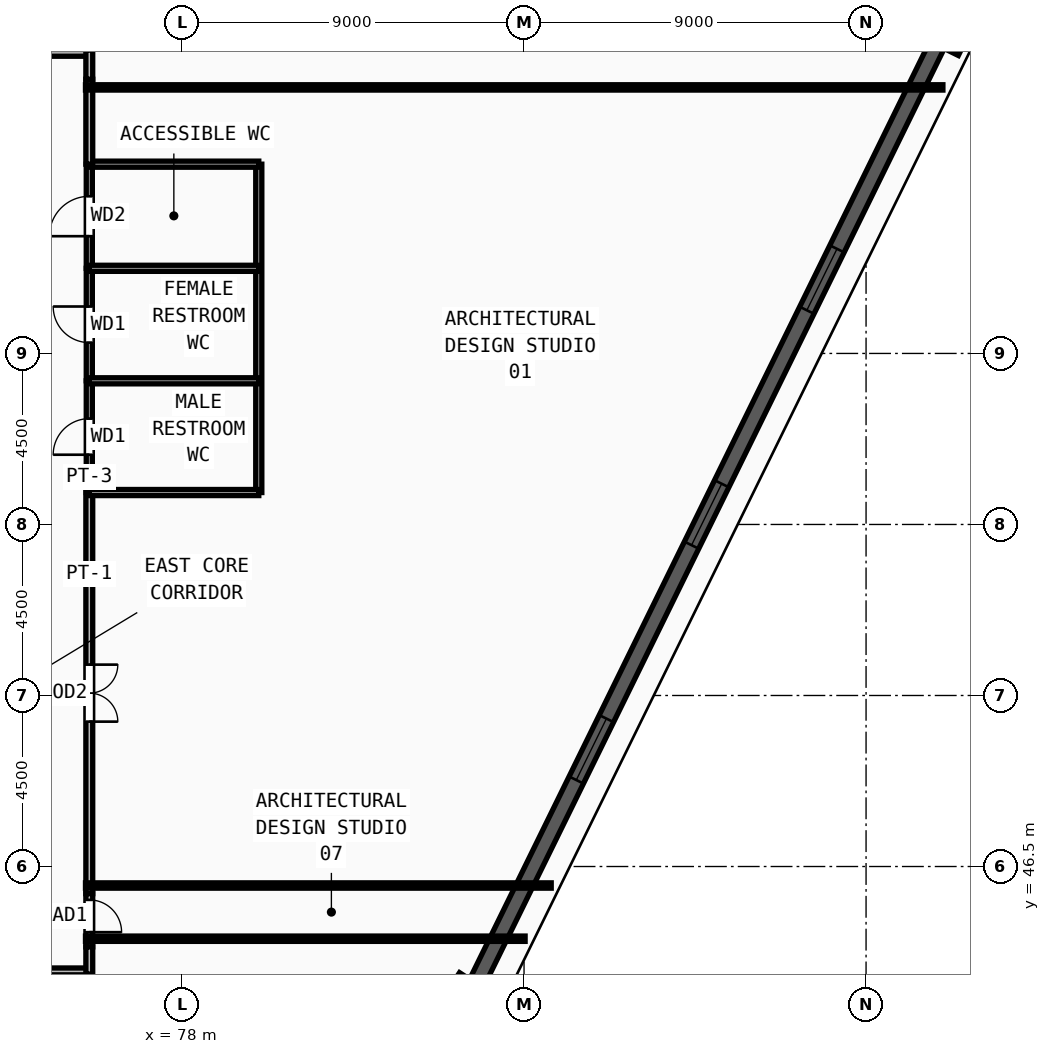
"""IFC4 building model, lengths in metres.
Left out: names, types, materials, properties, quantities, classifications, styles, units other than length and angle.
Written with IfcOpenShell. Run it as: python <this file> out.ifc"""

import sys

from ifc_helpers import new_model, si_unit, direction, frame, frame_2d, origin, origin_2d, place, context, subcontext, project, spatial, rectangle, extrude, source, transform, mapped, element, fill, save


model = new_model("IFC4")
c1 = context("Model", 3, precision=1e-05, world=origin(), true_north=direction((0.0, 1.0)))
c2 = subcontext(c1, "Body", "Model", "MODEL_VIEW")
j1 = project(units=[si_unit("LENGTHUNIT", "METRE"), si_unit("PLANEANGLEUNIT", "RADIAN")], contexts=[c1])
p1 = place(None, origin())
s1 = spatial("IfcSite", under=j1, at=p1, CompositionType="ELEMENT")
p2 = place(p1, origin())
s2 = spatial("IfcBuilding", under=s1, at=p2, CompositionType="ELEMENT")
p3 = place(p2, frame((0.0, 0.0, 63.0)))
s3 = spatial("IfcBuildingStorey", under=s2, at=p3, CompositionType="ELEMENT", Elevation=63.0)
m1 = source(origin(), c2, "Body", "SweptSolid", [
    extrude(rectangle(XDim=1.55, YDim=1.25, at=origin_2d()), origin(), (0.0, 0.0, 1.0), 3.75),
])
for number, where, z_axis, x_axis in (
    (1, (98.209, 68.811, 0.0), (0.0, 0.0, 1.0), (0.441, 0.898, 0.0)),
    (2, (85.401, 42.716, 0.0), (0.0, 0.0, 1.0), (0.548, 0.837, 0.0)),
):
    element("IfcColumn", number, at=place(p3, frame(where, z_axis=z_axis, x_axis=x_axis)), inside=s3, PredefinedType="COLUMN", context=c2, shape_type="MappedRepresentation", body=[
        mapped(m1, transform((0.0, 0.0, 0.0), x_axis=(1.0, 0.0, 0.0), y_axis=(0.0, 1.0, 0.0), z_axis=(0.0, 0.0, 1.0), scale=1.0)),
    ])
p4 = place(p3, frame((85.738, 43.403, 0.0), z_axis=(0.0, 0.0, 1.0), x_axis=(0.440623312768, 0.897692094343, 0.0)))
e3 = element("IfcWall", 3, at=p4, inside=s3, PredefinedType="SOLIDWALL", context=c2, shape_type="SweptSolid", body=[
    extrude(rectangle(XDim=27.538, YDim=0.42, at=frame_2d((13.769, 0.0))), origin(), (0.0, 0.0, 1.0), 3.57),
])
m2 = source(origin(), c2, "Body", "SweptSolid", [
    extrude(rectangle(XDim=1.8, YDim=1.95, at=frame_2d((0.9, 0.975))), frame((0.0, 0.22, 0.0), z_axis=(0.0, -1.0, 0.0), x_axis=(1.0, 0.0, 0.0)), (0.0, 0.0, 1.0), 0.44),
])
p5 = place(p4, frame((5.985, 0.0, 0.55)))
e4 = element("IfcOpeningElement", 4, at=p5, cuts=e3, PredefinedType="OPENING", context=c2, shape_type="MappedRepresentation", body=[
    mapped(m2, transform((0.0, 0.0, 0.0), x_axis=(1.0, 0.0, 0.0), y_axis=(0.0, 1.0, 0.0), z_axis=(0.0, 0.0, 1.0), scale=1.0)),
])
p6 = place(p4, frame((12.869, 0.0, 0.55)))
e5 = element("IfcOpeningElement", 5, at=p6, cuts=e3, PredefinedType="OPENING", context=c2, shape_type="MappedRepresentation", body=[
    mapped(m2, transform((0.0, 0.0, 0.0), x_axis=(1.0, 0.0, 0.0), y_axis=(0.0, 1.0, 0.0), z_axis=(0.0, 0.0, 1.0), scale=1.0)),
])
p7 = place(p4, frame((19.754, 0.0, 0.55)))
e6 = element("IfcOpeningElement", 6, at=p7, cuts=e3, PredefinedType="OPENING", context=c2, shape_type="MappedRepresentation", body=[
    mapped(m2, transform((0.0, 0.0, 0.0), x_axis=(1.0, 0.0, 0.0), y_axis=(0.0, 1.0, 0.0), z_axis=(0.0, 0.0, 1.0), scale=1.0)),
])
p8 = place(p3, frame((75.56, 56.34, 0.0), z_axis=(0.0, 0.0, 1.0), x_axis=(0.0, 1.0, 0.0)))
e7 = element("IfcWall", 7, at=p8, inside=s3, PredefinedType="PARTITIONING", context=c2, shape_type="SweptSolid", body=[
    extrude(rectangle(XDim=2.94, YDim=0.16, at=frame_2d((1.47, 0.0))), origin(), (0.0, 0.0, 1.0), 3.57),
])
m3 = source(origin(), c2, "Body", "SweptSolid", [
    extrude(rectangle(XDim=0.95, YDim=2.15, at=frame_2d((0.475, 1.075))), frame((0.0, 0.09, 0.0), z_axis=(0.0, -1.0, 0.0), x_axis=(1.0, 0.0, 0.0)), (0.0, 0.0, 1.0), 0.18),
])
p9 = place(p8, frame((0.995, 0.0, 0.0)))
e8 = element("IfcOpeningElement", 8, at=p9, cuts=e7, PredefinedType="OPENING", context=c2, shape_type="MappedRepresentation", body=[
    mapped(m3, transform((0.0, 0.0, 0.0), x_axis=(1.0, 0.0, 0.0), y_axis=(0.0, 1.0, 0.0), z_axis=(0.0, 0.0, 1.0), scale=1.0)),
])
p10 = place(p3, frame((75.56, 59.28, 0.0), z_axis=(0.0, 0.0, 1.0), x_axis=(0.0, 1.0, 0.0)))
e9 = element("IfcWall", 9, at=p10, inside=s3, PredefinedType="PARTITIONING", context=c2, shape_type="SweptSolid", body=[
    extrude(rectangle(XDim=2.96, YDim=0.16, at=frame_2d((1.48, 0.0))), origin(), (0.0, 0.0, 1.0), 3.57),
])
p11 = place(p10, frame((1.005, 0.0, 0.0)))
e10 = element("IfcOpeningElement", 10, at=p11, cuts=e9, PredefinedType="OPENING", context=c2, shape_type="MappedRepresentation", body=[
    mapped(m3, transform((0.0, 0.0, 0.0), x_axis=(1.0, 0.0, 0.0), y_axis=(0.0, 1.0, 0.0), z_axis=(0.0, 0.0, 1.0), scale=1.0)),
])
p12 = place(p3, frame((75.56, 62.24, 0.0), z_axis=(0.0, 0.0, 1.0), x_axis=(0.0, 1.0, 0.0)))
e11 = element("IfcWall", 11, at=p12, inside=s3, PredefinedType="PARTITIONING", context=c2, shape_type="SweptSolid", body=[
    extrude(rectangle(XDim=2.74, YDim=0.16, at=frame_2d((1.37, 0.0))), origin(), (0.0, 0.0, 1.0), 3.57),
])
m4 = source(origin(), c2, "Body", "SweptSolid", [
    extrude(rectangle(XDim=1.05, YDim=2.15, at=frame_2d((0.525, 1.075))), frame((0.0, 0.09, 0.0), z_axis=(0.0, -1.0, 0.0), x_axis=(1.0, 0.0, 0.0)), (0.0, 0.0, 1.0), 0.18),
])
p13 = place(p12, frame((0.845, 0.0, 0.0)))
e12 = element("IfcOpeningElement", 12, at=p13, cuts=e11, PredefinedType="OPENING", context=c2, shape_type="MappedRepresentation", body=[
    mapped(m4, transform((0.0, 0.0, 0.0), x_axis=(1.0, 0.0, 0.0), y_axis=(0.0, 1.0, 0.0), z_axis=(0.0, 0.0, 1.0), scale=1.0)),
])
p14 = place(p3, frame((75.56, 56.34, 0.0), z_axis=(0.0, 0.0, 1.0), x_axis=(0.0, -1.0, 0.0)))
e13 = element("IfcWall", 13, at=p14, inside=s3, PredefinedType="PARTITIONING", context=c2, shape_type="SweptSolid", body=[
    extrude(rectangle(XDim=10.555, YDim=0.18, at=frame_2d((5.278, 0.0))), origin(), (0.0, 0.0, 1.0), 3.57),
])
m5 = source(origin(), c2, "Body", "SweptSolid", [
    extrude(rectangle(XDim=1.5, YDim=2.2, at=frame_2d((0.75, 1.1))), frame((0.0, 0.1, 0.0), z_axis=(0.0, -1.0, 0.0), x_axis=(1.0, 0.0, 0.0)), (0.0, 0.0, 1.0), 0.2),
])
p15 = place(p14, frame((4.528, 0.0, 0.0)))
e14 = element("IfcOpeningElement", 14, at=p15, cuts=e13, PredefinedType="OPENING", context=c2, shape_type="MappedRepresentation", body=[
    mapped(m5, transform((0.0, 0.0, 0.0), x_axis=(1.0, 0.0, 0.0), y_axis=(0.0, 1.0, 0.0), z_axis=(0.0, 0.0, 1.0), scale=1.0)),
])
p16 = place(p3, frame((63.785, 67.91, 0.0), z_axis=(0.0, 0.0, 1.0), x_axis=(1.0, 0.0, 0.0)))
e15 = element("IfcWall", 15, at=p16, inside=s3, PredefinedType="PARTITIONING", context=c2, shape_type="SweptSolid", body=[
    extrude(rectangle(XDim=11.845, YDim=0.18, at=frame_2d((5.922, 0.0))), origin(), (0.0, 0.0, 1.0), 3.57),
])
p17 = place(p16, frame((5.172, 0.0, 0.0)))
e16 = element("IfcOpeningElement", 16, at=p17, cuts=e15, PredefinedType="OPENING", context=c2, shape_type="MappedRepresentation", body=[
    mapped(m5, transform((0.0, 0.0, 0.0), x_axis=(1.0, 0.0, 0.0), y_axis=(0.0, 1.0, 0.0), z_axis=(0.0, 0.0, 1.0), scale=1.0)),
])
p18 = place(p3, frame((75.63, 43.74, 0.0), z_axis=(0.0, 0.0, 1.0), x_axis=(-1.0, 0.0, 0.0)))
e17 = element("IfcWall", 17, at=p18, inside=s3, PredefinedType="PARTITIONING", context=c2, shape_type="SweptSolid", body=[
    extrude(rectangle(XDim=31.26, YDim=0.18, at=frame_2d((15.63, 0.0))), origin(), (0.0, 0.0, 1.0), 3.57),
])
p19 = place(p18, frame((9.78, 0.0, 0.0)))
e18 = element("IfcOpeningElement", 18, at=p19, cuts=e17, PredefinedType="OPENING", context=c2, shape_type="MappedRepresentation", body=[
    mapped(m5, transform((0.0, 0.0, 0.0), x_axis=(1.0, 0.0, 0.0), y_axis=(0.0, 1.0, 0.0), z_axis=(0.0, 0.0, 1.0), scale=1.0)),
])
p20 = place(p3, frame((75.56, 45.785, 0.0), z_axis=(0.0, 0.0, 1.0), x_axis=(0.0, -1.0, 0.0)))
e19 = element("IfcWall", 19, at=p20, inside=s3, PredefinedType="PARTITIONING", context=c2, shape_type="SweptSolid", body=[
    extrude(rectangle(XDim=1.4, YDim=0.18, at=frame_2d((0.7, 0.0))), origin(), (0.0, 0.0, 1.0), 3.57),
])
m6 = source(origin(), c2, "Body", "SweptSolid", [
    extrude(rectangle(XDim=0.85, YDim=2.1, at=frame_2d((0.425, 1.05))), frame((0.0, 0.1, 0.0), z_axis=(0.0, -1.0, 0.0), x_axis=(1.0, 0.0, 0.0)), (0.0, 0.0, 1.0), 0.2),
])
p21 = place(p20, frame((0.163, 0.0, 0.0)))
e20 = element("IfcOpeningElement", 20, at=p21, cuts=e19, PredefinedType="OPENING", context=c2, shape_type="MappedRepresentation", body=[
    mapped(m6, transform((0.0, 0.0, 0.0), x_axis=(1.0, 0.0, 0.0), y_axis=(0.0, 1.0, 0.0), z_axis=(0.0, 0.0, 1.0), scale=1.0)),
])
p22 = place(p3, frame((80.02, 56.34, 0.0), z_axis=(0.0, 0.0, 1.0), x_axis=(0.0, 1.0, 0.0)))
e21 = element("IfcWall", 21, at=p22, inside=s3, PredefinedType="PARTITIONING", context=c2, shape_type="SweptSolid", body=[
    extrude(rectangle(XDim=8.64, YDim=0.16, at=frame_2d((4.32, 0.0))), origin(), (0.0, 0.0, 1.0), 3.57),
])
for number, where, z_axis, x_axis in (
    (22, (75.56, 56.34, 0.0), (0.0, 0.0, 1.0), (1.0, 0.0, 0.0)),
    (23, (75.56, 59.28, 0.0), (0.0, 0.0, 1.0), (1.0, 0.0, 0.0)),
    (24, (75.56, 62.24, 0.0), (0.0, 0.0, 1.0), (1.0, 0.0, 0.0)),
    (25, (75.56, 64.98, 0.0), (0.0, 0.0, 1.0), (1.0, 0.0, 0.0)),
):
    element("IfcWall", number, at=place(p3, frame(where, z_axis=z_axis, x_axis=x_axis)), inside=s3, PredefinedType="PARTITIONING", context=c2, shape_type="SweptSolid", body=[
        extrude(rectangle(XDim=4.46, YDim=0.16, at=frame_2d((2.23, 0.0))), origin(), (0.0, 0.0, 1.0), 3.57),
    ])
p23 = place(p3, frame((75.56, 67.215, 0.0), z_axis=(0.0, 0.0, 1.0), x_axis=(0.0, -1.0, 0.0)))
e26 = element("IfcWall", 26, at=p23, inside=s3, PredefinedType="PARTITIONING", context=c2, shape_type="SweptSolid", body=[
    extrude(rectangle(XDim=2.235, YDim=0.18, at=frame_2d((1.118, 0.0))), origin(), (0.0, 0.0, 1.0), 3.57),
])
p24 = place(p3, frame((75.56, 67.98, 0.0), z_axis=(0.0, 0.0, 1.0), x_axis=(0.0, -1.0, 0.0)))
e27 = element("IfcWall", 27, at=p24, inside=s3, PredefinedType="PARTITIONING", context=c2, shape_type="SweptSolid", body=[
    extrude(rectangle(XDim=0.765, YDim=0.18, at=frame_2d((0.382, 0.0))), origin(), (0.0, 0.0, 1.0), 3.57),
])
p25 = place(p3, frame((75.56, 44.385, 0.0), z_axis=(0.0, 0.0, 1.0), x_axis=(0.0, -1.0, 0.0)))
e28 = element("IfcWall", 28, at=p25, inside=s3, PredefinedType="PARTITIONING", context=c2, shape_type="SweptSolid", body=[
    extrude(rectangle(XDim=0.715, YDim=0.18, at=frame_2d((0.357, 0.0))), origin(), (0.0, 0.0, 1.0), 3.57),
])
p26 = place(p3, frame((75.46, 44.6, 0.0), z_axis=(0.0, 0.0, 1.0), x_axis=(1.0, 0.0, 0.0)))
e29 = element("IfcWall", 29, at=p26, inside=s3, PredefinedType="PARTITIONING", context=c2, shape_type="SweptSolid", body=[
    extrude(rectangle(XDim=11.568, YDim=0.14, at=frame_2d((5.784, 0.0))), origin(), (0.0, 0.0, 1.0), 2.705),
])
p27 = place(p3, frame((75.46, 46.0, 0.0), z_axis=(0.0, 0.0, 1.0), x_axis=(1.0, 0.0, 0.0)))
e30 = element("IfcWall", 30, at=p27, inside=s3, PredefinedType="PARTITIONING", context=c2, shape_type="SweptSolid", body=[
    extrude(rectangle(XDim=12.255, YDim=0.14, at=frame_2d((6.127, 0.0))), origin(), (0.0, 0.0, 1.0), 3.57),
])
p28 = place(p3, frame((75.46, 67.0, 0.0), z_axis=(0.0, 0.0, 1.0), x_axis=(1.0, 0.0, 0.0)))
e31 = element("IfcWall", 31, at=p28, inside=s3, PredefinedType="PARTITIONING", context=c2, shape_type="SweptSolid", body=[
    extrude(rectangle(XDim=22.562, YDim=0.14, at=frame_2d((11.281, 0.0))), origin(), (0.0, 0.0, 1.0), 2.655),
])
m7 = source(origin(), c2, "Body", "SweptSolid", [
    extrude(rectangle(XDim=1.8, YDim=1.95, at=frame_2d((0.9, 0.975))), frame((0.0, 0.03, 0.0), z_axis=(0.0, -1.0, 0.0), x_axis=(1.0, 0.0, 0.0)), (0.0, 0.0, 1.0), 0.06),
])
p29 = place(p5, origin())
e32 = element("IfcWindow", 32, at=p29, inside=s3, PartitioningType="DOUBLE_PANEL_VERTICAL", PredefinedType="WINDOW", context=c2, shape_type="MappedRepresentation", body=[
    mapped(m7, transform((0.0, 0.0, 0.0), x_axis=(1.0, 0.0, 0.0), y_axis=(0.0, 1.0, 0.0), z_axis=(0.0, 0.0, 1.0), scale=1.0)),
])
fill(e4, e32)
p30 = place(p6, origin())
e33 = element("IfcWindow", 33, at=p30, inside=s3, PartitioningType="DOUBLE_PANEL_VERTICAL", PredefinedType="WINDOW", context=c2, shape_type="MappedRepresentation", body=[
    mapped(m7, transform((0.0, 0.0, 0.0), x_axis=(1.0, 0.0, 0.0), y_axis=(0.0, 1.0, 0.0), z_axis=(0.0, 0.0, 1.0), scale=1.0)),
])
fill(e5, e33)
p31 = place(p7, origin())
e34 = element("IfcWindow", 34, at=p31, inside=s3, PartitioningType="DOUBLE_PANEL_VERTICAL", PredefinedType="WINDOW", context=c2, shape_type="MappedRepresentation", body=[
    mapped(m7, transform((0.0, 0.0, 0.0), x_axis=(1.0, 0.0, 0.0), y_axis=(0.0, 1.0, 0.0), z_axis=(0.0, 0.0, 1.0), scale=1.0)),
])
fill(e6, e34)
m8 = source(origin(), c2, "Body", "SweptSolid", [
    extrude(rectangle(XDim=0.95, YDim=2.15, at=frame_2d((0.475, 1.075))), frame((0.0, 0.025, 0.0), z_axis=(0.0, -1.0, 0.0), x_axis=(1.0, 0.0, 0.0)), (0.0, 0.0, 1.0), 0.05),
])
p32 = place(p9, origin())
e35 = element("IfcDoor", 35, at=p32, inside=s3, OperationType="SINGLE_SWING_LEFT", PredefinedType="DOOR", context=c2, shape_type="MappedRepresentation", body=[
    mapped(m8, transform((0.0, 0.0, 0.0), x_axis=(1.0, 0.0, 0.0), y_axis=(0.0, 1.0, 0.0), z_axis=(0.0, 0.0, 1.0), scale=1.0)),
])
fill(e8, e35)
p33 = place(p11, origin())
e36 = element("IfcDoor", 36, at=p33, inside=s3, OperationType="SINGLE_SWING_RIGHT", PredefinedType="DOOR", context=c2, shape_type="MappedRepresentation", body=[
    mapped(m8, transform((0.0, 0.0, 0.0), x_axis=(1.0, 0.0, 0.0), y_axis=(0.0, 1.0, 0.0), z_axis=(0.0, 0.0, 1.0), scale=1.0)),
])
fill(e10, e36)
m9 = source(origin(), c2, "Body", "SweptSolid", [
    extrude(rectangle(XDim=1.05, YDim=2.15, at=frame_2d((0.525, 1.075))), frame((0.0, 0.025, 0.0), z_axis=(0.0, -1.0, 0.0), x_axis=(1.0, 0.0, 0.0)), (0.0, 0.0, 1.0), 0.05),
])
p34 = place(p13, origin())
e37 = element("IfcDoor", 37, at=p34, inside=s3, OperationType="SINGLE_SWING_LEFT", PredefinedType="DOOR", context=c2, shape_type="MappedRepresentation", body=[
    mapped(m9, transform((0.0, 0.0, 0.0), x_axis=(1.0, 0.0, 0.0), y_axis=(0.0, 1.0, 0.0), z_axis=(0.0, 0.0, 1.0), scale=1.0)),
])
fill(e12, e37)
m10 = source(origin(), c2, "Body", "SweptSolid", [
    extrude(rectangle(XDim=1.5, YDim=2.2, at=frame_2d((0.75, 1.1))), frame((0.0, 0.025, 0.0), z_axis=(0.0, -1.0, 0.0), x_axis=(1.0, 0.0, 0.0)), (0.0, 0.0, 1.0), 0.05),
])
p35 = place(p15, origin())
e38 = element("IfcDoor", 38, at=p35, inside=s3, OperationType="DOUBLE_DOOR_SINGLE_SWING", PredefinedType="DOOR", context=c2, shape_type="MappedRepresentation", body=[
    mapped(m10, transform((0.0, 0.0, 0.0), x_axis=(1.0, 0.0, 0.0), y_axis=(0.0, 1.0, 0.0), z_axis=(0.0, 0.0, 1.0), scale=1.0)),
])
fill(e14, e38)
m11 = source(origin(), c2, "Body", "SweptSolid", [
    extrude(rectangle(XDim=0.85, YDim=2.1, at=frame_2d((0.425, 1.05))), frame((0.0, 0.025, 0.0), z_axis=(0.0, -1.0, 0.0), x_axis=(1.0, 0.0, 0.0)), (0.0, 0.0, 1.0), 0.05),
])
p36 = place(p21, origin())
e39 = element("IfcDoor", 39, at=p36, inside=s3, OperationType="SINGLE_SWING_RIGHT", PredefinedType="DOOR", context=c2, shape_type="MappedRepresentation", body=[
    mapped(m11, transform((0.0, 0.0, 0.0), x_axis=(1.0, 0.0, 0.0), y_axis=(0.0, 1.0, 0.0), z_axis=(0.0, 0.0, 1.0), scale=1.0)),
])
fill(e20, e39)
save(model, sys.argv[1])
